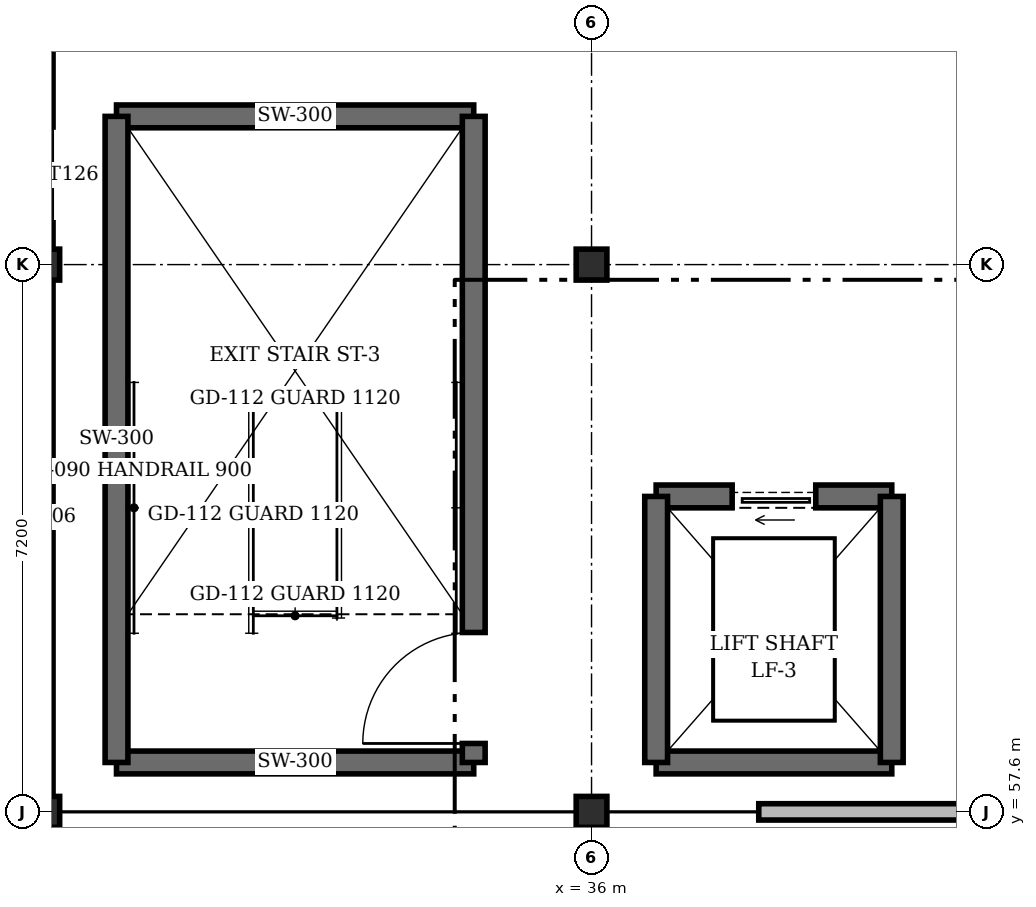
"""IFC4 building model, lengths in metres.
Left out: names, types, materials, properties, quantities, classifications, styles, units other than length and angle.
Written with IfcOpenShell. Run it as: python <this file> out.ifc"""

import sys

from ifc_helpers import new_model, si_unit, direction, frame, frame_2d, origin, origin_2d, place, context, subcontext, project, spatial, rectangle, i_section, extrude, element, fill, save


model = new_model("IFC4")
c1 = context("Model", 3, precision=1e-05, world=origin(), true_north=direction((0.0, 1.0)))
c2 = subcontext(c1, "Body", "Model", "MODEL_VIEW")
j1 = project(units=[si_unit("LENGTHUNIT", "METRE"), si_unit("PLANEANGLEUNIT", "RADIAN")], contexts=[c1])
p1 = place(None, origin())
s1 = spatial("IfcSite", under=j1, at=p1, CompositionType="ELEMENT")
p2 = place(p1, origin())
s2 = spatial("IfcBuilding", under=s1, at=p2, CompositionType="ELEMENT")
p3 = place(p2, frame((0.0, 0.0, 10.2)))
s3 = spatial("IfcBuildingStorey", under=s2, at=p3, CompositionType="ELEMENT", Elevation=10.2)
for number, where, z_axis, x_axis in (
    (1, (28.8, 57.6, 0.0), (0.0, 0.0, 1.0), (1.0, 0.0, 0.0)),
    (2, (28.8, 64.8, 0.0), (0.0, 0.0, 1.0), (1.0, 0.0, 0.0)),
    (3, (36.0, 57.6, 0.0), (0.0, 0.0, 1.0), (1.0, 0.0, 0.0)),
    (4, (36.0, 64.8, 0.0), (0.0, 0.0, 1.0), (1.0, 0.0, 0.0)),
):
    element("IfcColumn", number, at=place(p3, frame(where, z_axis=z_axis, x_axis=x_axis)), inside=s3, PredefinedType="COLUMN", context=c2, shape_type="SweptSolid", body=[
        extrude(i_section(OverallWidth=0.404, OverallDepth=0.407, WebThickness=0.027, FlangeThickness=0.044, at=origin_2d()), origin(), (0.0, 0.0, 1.0), 4.2),
    ])
p4 = place(p3, frame((28.8, 99.0, 0.0), z_axis=(0.0, 0.0, 1.0), x_axis=(0.0, -1.0, 0.0)))
e5 = element("IfcWall", 5, at=p4, inside=s3, PredefinedType="STANDARD", context=c2, shape_type="SweptSolid", body=[
    extrude(rectangle(XDim=41.4, YDim=0.23, at=frame_2d((20.7, 0.0))), origin(), (0.0, 0.0, 1.0), 3.0),
])
p5 = place(p4, frame((32.39, 0.0, 1.25)))
e6 = element("IfcOpeningElement", 6, at=p5, cuts=e5, PredefinedType="OPENING", context=c2, shape_type="SweptSolid", body=[
    extrude(rectangle(XDim=1.26, YDim=1.38, at=frame_2d((0.63, 0.69))), frame((0.0, 0.125, 0.0), z_axis=(0.0, -1.0, 0.0), x_axis=(1.0, 0.0, 0.0)), (0.0, 0.0, 1.0), 0.25),
])
p6 = place(p4, frame((25.19, 0.0, 1.25)))
e7 = element("IfcOpeningElement", 7, at=p6, cuts=e5, PredefinedType="OPENING", context=c2, shape_type="SweptSolid", body=[
    extrude(rectangle(XDim=1.26, YDim=1.38, at=frame_2d((0.63, 0.69))), frame((0.0, 0.125, 0.0), z_axis=(0.0, -1.0, 0.0), x_axis=(1.0, 0.0, 0.0)), (0.0, 0.0, 1.0), 0.25),
])
p7 = place(p4, frame((17.99, 0.0, 1.25)))
e8 = element("IfcOpeningElement", 8, at=p7, cuts=e5, PredefinedType="OPENING", context=c2, shape_type="SweptSolid", body=[
    extrude(rectangle(XDim=1.26, YDim=1.38, at=frame_2d((0.63, 0.69))), frame((0.0, 0.125, 0.0), z_axis=(0.0, -1.0, 0.0), x_axis=(1.0, 0.0, 0.0)), (0.0, 0.0, 1.0), 0.25),
])
p8 = place(p4, frame((0.84, 0.0, 1.25)))
e9 = element("IfcOpeningElement", 9, at=p8, cuts=e5, PredefinedType="OPENING", context=c2, shape_type="SweptSolid", body=[
    extrude(rectangle(XDim=1.26, YDim=1.38, at=frame_2d((0.63, 0.69))), frame((0.0, 0.125, 0.0), z_axis=(0.0, -1.0, 0.0), x_axis=(1.0, 0.0, 0.0)), (0.0, 0.0, 1.0), 0.25),
])
for number, where, z_axis, x_axis in (
    (10, (29.75, 58.25, 0.0), (0.0, 0.0, 1.0), (1.0, 0.0, 0.0)),
    (11, (34.45, 66.75, 0.0), (0.0, 0.0, 1.0), (-1.0, 0.0, 0.0)),
):
    element("IfcWall", number, at=place(p3, frame(where, z_axis=z_axis, x_axis=x_axis)), inside=s3, PredefinedType="SHEAR", context=c2, shape_type="SweptSolid", body=[
        extrude(rectangle(XDim=4.7, YDim=0.3, at=frame_2d((2.35, 0.0))), origin(), (0.0, 0.0, 1.0), 3.95),
    ])
p9 = place(p3, frame((29.75, 66.75, 0.0), z_axis=(0.0, 0.0, 1.0), x_axis=(0.0, -1.0, 0.0)))
e12 = element("IfcWall", 12, at=p9, inside=s3, PredefinedType="SHEAR", context=c2, shape_type="SweptSolid", body=[
    extrude(rectangle(XDim=8.5, YDim=0.3, at=frame_2d((4.25, 0.0))), origin(), (0.0, 0.0, 1.0), 3.95),
])
p10 = place(p3, frame((34.45, 58.25, 0.0), z_axis=(0.0, 0.0, 1.0), x_axis=(0.0, 1.0, 0.0)))
e13 = element("IfcWall", 13, at=p10, inside=s3, PredefinedType="SHEAR", context=c2, shape_type="SweptSolid", body=[
    extrude(rectangle(XDim=8.5, YDim=0.3, at=frame_2d((4.25, 0.0))), origin(), (0.0, 0.0, 1.0), 3.95),
])
p11 = place(p10, frame((0.25, 0.0, 0.0)))
e14 = element("IfcOpeningElement", 14, at=p11, cuts=e13, PredefinedType="OPENING", context=c2, shape_type="SweptSolid", body=[
    extrude(rectangle(XDim=1.46, YDim=2.24, at=frame_2d((0.73, 1.12))), frame((0.0, 0.16, 0.0), z_axis=(0.0, -1.0, 0.0), x_axis=(1.0, 0.0, 0.0)), (0.0, 0.0, 1.0), 0.32),
])
p12 = place(p3, frame((36.85, 58.25, 0.0), z_axis=(0.0, 0.0, 1.0), x_axis=(1.0, 0.0, 0.0)))
e15 = element("IfcWall", 15, at=p12, inside=s3, PredefinedType="SHEAR", context=c2, shape_type="SweptSolid", body=[
    extrude(rectangle(XDim=3.1, YDim=0.3, at=frame_2d((1.55, 0.0))), origin(), (0.0, 0.0, 1.0), 3.95),
])
p13 = place(p3, frame((39.95, 61.75, 0.0), z_axis=(0.0, 0.0, 1.0), x_axis=(-1.0, 0.0, 0.0)))
e16 = element("IfcWall", 16, at=p13, inside=s3, PredefinedType="SHEAR", context=c2, shape_type="SweptSolid", body=[
    extrude(rectangle(XDim=3.1, YDim=0.3, at=frame_2d((1.55, 0.0))), origin(), (0.0, 0.0, 1.0), 3.95),
])
p14 = place(p13, frame((1.0, 0.0, 0.0)))
e17 = element("IfcOpeningElement", 17, at=p14, cuts=e16, PredefinedType="OPENING", context=c2, shape_type="SweptSolid", body=[
    extrude(rectangle(XDim=1.1, YDim=2.22, at=frame_2d((0.55, 1.11))), frame((0.0, 0.16, 0.0), z_axis=(0.0, -1.0, 0.0), x_axis=(1.0, 0.0, 0.0)), (0.0, 0.0, 1.0), 0.32),
])
for number, where, z_axis, x_axis in (
    (18, (36.85, 61.75, 0.0), (0.0, 0.0, 1.0), (0.0, -1.0, 0.0)),
    (19, (39.95, 58.25, 0.0), (0.0, 0.0, 1.0), (0.0, 1.0, 0.0)),
):
    element("IfcWall", number, at=place(p3, frame(where, z_axis=z_axis, x_axis=x_axis)), inside=s3, PredefinedType="SHEAR", context=c2, shape_type="SweptSolid", body=[
        extrude(rectangle(XDim=3.5, YDim=0.3, at=frame_2d((1.75, 0.0))), origin(), (0.0, 0.0, 1.0), 3.95),
    ])
p15 = place(p3, frame((38.2, 57.6, 0.0), z_axis=(0.0, 0.0, 1.0), x_axis=(1.0, 0.0, 0.0)))
e20 = element("IfcWall", 20, at=p15, inside=s3, PredefinedType="STANDARD", context=c2, shape_type="SweptSolid", body=[
    extrude(rectangle(XDim=8.8, YDim=0.215, at=frame_2d((4.4, 0.0))), origin(), (0.0, 0.0, 1.0), 3.038),
])
p16 = place(p15, frame((6.55, 0.0, 0.0)))
e21 = element("IfcOpeningElement", 21, at=p16, cuts=e20, PredefinedType="OPENING", context=c2, shape_type="SweptSolid", body=[
    extrude(rectangle(XDim=1.46, YDim=2.26, at=frame_2d((0.73, 1.13))), frame((0.0, 0.117, 0.0), z_axis=(0.0, -1.0, 0.0), x_axis=(1.0, 0.0, 0.0)), (0.0, 0.0, 1.0), 0.235),
])
p17 = place(p11, origin())
e22 = element("IfcDoor", 22, at=p17, inside=s3, OperationType="SINGLE_SWING_LEFT", PredefinedType="DOOR", context=c2, shape_type="SweptSolid", body=[
    extrude(rectangle(XDim=1.46, YDim=2.24, at=frame_2d((0.73, 1.12))), frame((0.0, 0.025, 0.0), z_axis=(0.0, -1.0, 0.0), x_axis=(1.0, 0.0, 0.0)), (0.0, 0.0, 1.0), 0.05),
])
fill(e14, e22)
p18 = place(p14, origin())
e23 = element("IfcDoor", 23, at=p18, inside=s3, OperationType="SLIDING_TO_LEFT", PredefinedType="DOOR", context=c2, shape_type="SweptSolid", body=[
    extrude(rectangle(XDim=1.1, YDim=2.22, at=frame_2d((0.55, 1.11))), frame((0.0, 0.025, 0.0), z_axis=(0.0, -1.0, 0.0), x_axis=(1.0, 0.0, 0.0)), (0.0, 0.0, 1.0), 0.05),
])
fill(e17, e23)
save(model, sys.argv[1])
